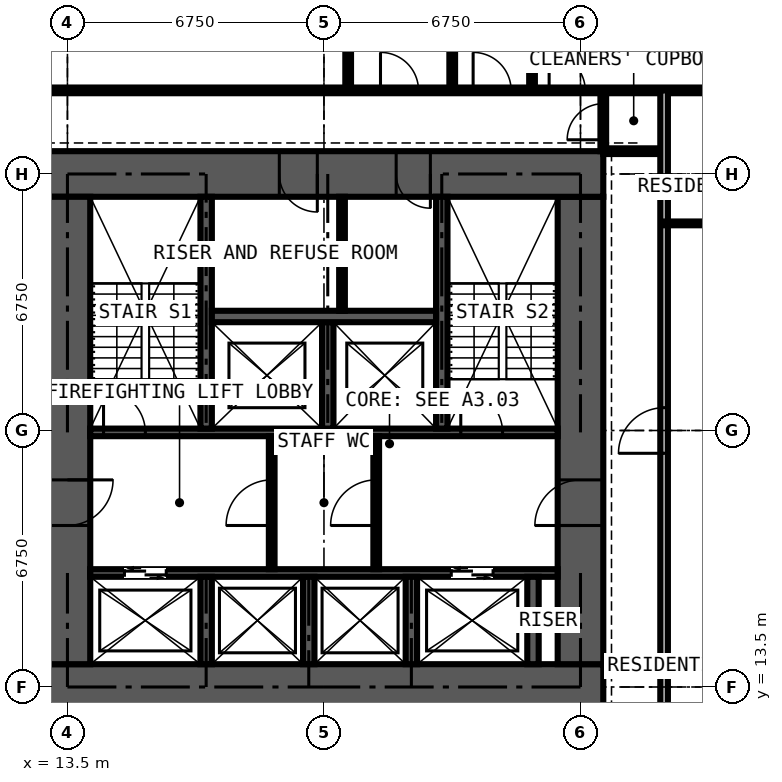
"""IFC4 building model, lengths in metres.
Left out: names, types, materials, properties, quantities, classifications, styles, units other than length and angle.
Written with IfcOpenShell. Run it as: python <this file> out.ifc"""

import sys

from ifc_helpers import new_model, si_unit, direction, frame, frame_2d, origin, place, context, subcontext, project, spatial, rectangle, extrude, element, fill, save


model = new_model("IFC4")
c1 = context("Model", 3, precision=1e-05, world=origin(), true_north=direction((0.0, 1.0)))
c2 = subcontext(c1, "Body", "Model", "MODEL_VIEW")
j1 = project(units=[si_unit("LENGTHUNIT", "METRE"), si_unit("PLANEANGLEUNIT", "RADIAN")], contexts=[c1])
p1 = place(None, origin())
s1 = spatial("IfcSite", under=j1, at=p1, CompositionType="ELEMENT")
p2 = place(p1, origin())
s2 = spatial("IfcBuilding", under=s1, at=p2, CompositionType="ELEMENT")
p3 = place(p2, frame((0.0, 0.0, 61.2)))
s3 = spatial("IfcBuildingStorey", under=s2, at=p3, CompositionType="ELEMENT", Elevation=61.2)
p4 = place(p3, frame((12.9, 13.5, 0.0), z_axis=(0.0, 0.0, 1.0), x_axis=(1.0, 0.0, 0.0)))
e1 = element("IfcWall", 1, at=p4, inside=s3, PredefinedType="SHEAR", context=c2, shape_type="SweptSolid", body=[
    extrude(rectangle(XDim=14.7, YDim=1.2, at=frame_2d((7.35, 0.0))), origin(), (0.0, 0.0, 1.0), 3.6),
])
p5 = place(p3, frame((27.0, 14.1, 0.0), z_axis=(0.0, 0.0, 1.0), x_axis=(0.0, 1.0, 0.0)))
e2 = element("IfcWall", 2, at=p5, inside=s3, PredefinedType="SHEAR", context=c2, shape_type="SweptSolid", body=[
    extrude(rectangle(XDim=12.3, YDim=1.2, at=frame_2d((6.15, 0.0))), origin(), (0.0, 0.0, 1.0), 3.6),
])
p6 = place(p5, frame((3.65, 0.0, 0.0)))
e3 = element("IfcOpeningElement", 3, at=p6, cuts=e2, PredefinedType="OPENING", context=c2, shape_type="SweptSolid", body=[
    extrude(rectangle(XDim=1.2, YDim=2.2, at=frame_2d((0.6, 1.1))), frame((0.0, 0.61, 0.0), z_axis=(0.0, -1.0, 0.0), x_axis=(1.0, 0.0, 0.0)), (0.0, 0.0, 1.0), 1.22),
])
p7 = place(p3, frame((27.6, 27.0, 0.0), z_axis=(0.0, 0.0, 1.0), x_axis=(-1.0, 0.0, 0.0)))
e4 = element("IfcWall", 4, at=p7, inside=s3, PredefinedType="SHEAR", context=c2, shape_type="SweptSolid", body=[
    extrude(rectangle(XDim=14.7, YDim=1.2, at=frame_2d((7.35, 0.0))), origin(), (0.0, 0.0, 1.0), 3.6),
])
p8 = place(p7, frame((4.55, 0.0, 0.0)))
e5 = element("IfcOpeningElement", 5, at=p8, cuts=e4, PredefinedType="OPENING", context=c2, shape_type="SweptSolid", body=[
    extrude(rectangle(XDim=0.9, YDim=2.2, at=frame_2d((0.45, 1.1))), frame((0.0, 0.61, 0.0), z_axis=(0.0, -1.0, 0.0), x_axis=(1.0, 0.0, 0.0)), (0.0, 0.0, 1.0), 1.22),
])
p9 = place(p7, frame((7.525, 0.0, 0.0)))
e6 = element("IfcOpeningElement", 6, at=p9, cuts=e4, PredefinedType="OPENING", context=c2, shape_type="SweptSolid", body=[
    extrude(rectangle(XDim=1.0, YDim=2.2, at=frame_2d((0.5, 1.1))), frame((0.0, 0.61, 0.0), z_axis=(0.0, -1.0, 0.0), x_axis=(1.0, 0.0, 0.0)), (0.0, 0.0, 1.0), 1.22),
])
p10 = place(p3, frame((13.5, 26.4, 0.0), z_axis=(0.0, 0.0, 1.0), x_axis=(0.0, -1.0, 0.0)))
e7 = element("IfcWall", 7, at=p10, inside=s3, PredefinedType="SHEAR", context=c2, shape_type="SweptSolid", body=[
    extrude(rectangle(XDim=12.3, YDim=1.2, at=frame_2d((6.15, 0.0))), origin(), (0.0, 0.0, 1.0), 3.6),
])
p11 = place(p10, frame((7.45, 0.0, 0.0)))
e8 = element("IfcOpeningElement", 8, at=p11, cuts=e7, PredefinedType="OPENING", context=c2, shape_type="SweptSolid", body=[
    extrude(rectangle(XDim=1.2, YDim=2.2, at=frame_2d((0.6, 1.1))), frame((0.0, 0.61, 0.0), z_axis=(0.0, -1.0, 0.0), x_axis=(1.0, 0.0, 0.0)), (0.0, 0.0, 1.0), 1.22),
])
p12 = place(p3, frame((14.1, 16.5, 0.0), z_axis=(0.0, 0.0, 1.0), x_axis=(1.0, 0.0, 0.0)))
e9 = element("IfcWall", 9, at=p12, inside=s3, PredefinedType="SHEAR", context=c2, shape_type="SweptSolid", body=[
    extrude(rectangle(XDim=12.3, YDim=0.2, at=frame_2d((6.15, 0.0))), origin(), (0.0, 0.0, 1.0), 3.6),
])
p13 = place(p12, frame((0.9, 0.0, 0.0)))
e10 = element("IfcOpeningElement", 10, at=p13, cuts=e9, PredefinedType="OPENING", context=c2, shape_type="SweptSolid", body=[
    extrude(rectangle(XDim=1.1, YDim=2.2, at=frame_2d((0.55, 1.1))), frame((0.0, 0.11, 0.0), z_axis=(0.0, -1.0, 0.0), x_axis=(1.0, 0.0, 0.0)), (0.0, 0.0, 1.0), 0.22),
])
p14 = place(p12, frame((9.5, 0.0, 0.0)))
e11 = element("IfcOpeningElement", 11, at=p14, cuts=e9, PredefinedType="OPENING", context=c2, shape_type="SweptSolid", body=[
    extrude(rectangle(XDim=1.1, YDim=2.2, at=frame_2d((0.55, 1.1))), frame((0.0, 0.11, 0.0), z_axis=(0.0, -1.0, 0.0), x_axis=(1.0, 0.0, 0.0)), (0.0, 0.0, 1.0), 0.22),
])
p15 = place(p3, frame((14.1, 20.2, 0.0), z_axis=(0.0, 0.0, 1.0), x_axis=(1.0, 0.0, 0.0)))
e12 = element("IfcWall", 12, at=p15, inside=s3, PredefinedType="SHEAR", context=c2, shape_type="SweptSolid", body=[
    extrude(rectangle(XDim=12.3, YDim=0.2, at=frame_2d((6.15, 0.0))), origin(), (0.0, 0.0, 1.0), 3.6),
])
p16 = place(p15, frame((0.35, 0.0, 0.0)))
e13 = element("IfcOpeningElement", 13, at=p16, cuts=e12, PredefinedType="OPENING", context=c2, shape_type="SweptSolid", body=[
    extrude(rectangle(XDim=1.1, YDim=2.2, at=frame_2d((0.55, 1.1))), frame((0.0, 0.11, 0.0), z_axis=(0.0, -1.0, 0.0), x_axis=(1.0, 0.0, 0.0)), (0.0, 0.0, 1.0), 0.22),
])
p17 = place(p15, frame((9.75, 0.0, 0.0)))
e14 = element("IfcOpeningElement", 14, at=p17, cuts=e12, PredefinedType="OPENING", context=c2, shape_type="SweptSolid", body=[
    extrude(rectangle(XDim=1.1, YDim=2.2, at=frame_2d((0.55, 1.1))), frame((0.0, 0.11, 0.0), z_axis=(0.0, -1.0, 0.0), x_axis=(1.0, 0.0, 0.0)), (0.0, 0.0, 1.0), 0.22),
])
for number, where, z_axis, x_axis in (
    (15, (17.15, 20.3, 0.0), (0.0, 0.0, 1.0), (0.0, 1.0, 0.0)),
    (16, (23.35, 20.3, 0.0), (0.0, 0.0, 1.0), (0.0, 1.0, 0.0)),
):
    element("IfcWall", number, at=place(p3, frame(where, z_axis=z_axis, x_axis=x_axis)), inside=s3, PredefinedType="SHEAR", context=c2, shape_type="SweptSolid", body=[
        extrude(rectangle(XDim=6.1, YDim=0.3, at=frame_2d((3.05, 0.0))), origin(), (0.0, 0.0, 1.0), 3.6),
    ])
p18 = place(p3, frame((20.35, 20.3, 0.0), z_axis=(0.0, 0.0, 1.0), x_axis=(0.0, 1.0, 0.0)))
e17 = element("IfcWall", 17, at=p18, inside=s3, PredefinedType="SHEAR", context=c2, shape_type="SweptSolid", body=[
    extrude(rectangle(XDim=2.8, YDim=0.3, at=frame_2d((1.4, 0.0))), origin(), (0.0, 0.0, 1.0), 3.6),
])
p19 = place(p3, frame((17.3, 23.25, 0.0), z_axis=(0.0, 0.0, 1.0), x_axis=(1.0, 0.0, 0.0)))
e18 = element("IfcWall", 18, at=p19, inside=s3, PredefinedType="SHEAR", context=c2, shape_type="SweptSolid", body=[
    extrude(rectangle(XDim=5.9, YDim=0.3, at=frame_2d((2.95, 0.0))), origin(), (0.0, 0.0, 1.0), 3.6),
])
for number, where, z_axis, x_axis in (
    (19, (17.15, 14.1, 0.0), (0.0, 0.0, 1.0), (0.0, 1.0, 0.0)),
    (20, (19.85, 14.1, 0.0), (0.0, 0.0, 1.0), (0.0, 1.0, 0.0)),
    (21, (22.55, 14.1, 0.0), (0.0, 0.0, 1.0), (0.0, 1.0, 0.0)),
    (22, (25.75, 14.1, 0.0), (0.0, 0.0, 1.0), (0.0, 1.0, 0.0)),
):
    element("IfcWall", number, at=place(p3, frame(where, z_axis=z_axis, x_axis=x_axis)), inside=s3, PredefinedType="SHEAR", context=c2, shape_type="SweptSolid", body=[
        extrude(rectangle(XDim=2.3, YDim=0.3, at=frame_2d((1.15, 0.0))), origin(), (0.0, 0.0, 1.0), 3.6),
    ])
p20 = place(p3, frame((18.875, 16.6, 0.0), z_axis=(0.0, 0.0, 1.0), x_axis=(0.0, 1.0, 0.0)))
e23 = element("IfcWall", 23, at=p20, inside=s3, PredefinedType="PARTITIONING", context=c2, shape_type="SweptSolid", body=[
    extrude(rectangle(XDim=3.5, YDim=0.15, at=frame_2d((1.75, 0.0))), origin(), (0.0, 0.0, 1.0), 3.375),
])
p21 = place(p20, frame((1.15, 0.0, 0.0)))
e24 = element("IfcOpeningElement", 24, at=p21, cuts=e23, PredefinedType="OPENING", context=c2, shape_type="SweptSolid", body=[
    extrude(rectangle(XDim=1.2, YDim=2.2, at=frame_2d((0.6, 1.1))), frame((0.0, 0.085, 0.0), z_axis=(0.0, -1.0, 0.0), x_axis=(1.0, 0.0, 0.0)), (0.0, 0.0, 1.0), 0.17),
])
p22 = place(p3, frame((21.625, 16.6, 0.0), z_axis=(0.0, 0.0, 1.0), x_axis=(0.0, 1.0, 0.0)))
e25 = element("IfcWall", 25, at=p22, inside=s3, PredefinedType="PARTITIONING", context=c2, shape_type="SweptSolid", body=[
    extrude(rectangle(XDim=3.5, YDim=0.15, at=frame_2d((1.75, 0.0))), origin(), (0.0, 0.0, 1.0), 3.375),
])
p23 = place(p22, frame((1.15, 0.0, 0.0)))
e26 = element("IfcOpeningElement", 26, at=p23, cuts=e25, PredefinedType="OPENING", context=c2, shape_type="SweptSolid", body=[
    extrude(rectangle(XDim=1.2, YDim=2.2, at=frame_2d((0.6, 1.1))), frame((0.0, 0.085, 0.0), z_axis=(0.0, -1.0, 0.0), x_axis=(1.0, 0.0, 0.0)), (0.0, 0.0, 1.0), 0.17),
])
p24 = place(p3, frame((20.725, 23.4, 0.0), z_axis=(0.0, 0.0, 1.0), x_axis=(0.0, 1.0, 0.0)))
e27 = element("IfcWall", 27, at=p24, inside=s3, PredefinedType="PARTITIONING", context=c2, shape_type="SweptSolid", body=[
    extrude(rectangle(XDim=3.0, YDim=0.15, at=frame_2d((1.5, 0.0))), origin(), (0.0, 0.0, 1.0), 3.375),
])
p25 = place(p3, frame((11.3, 29.2, 0.0), z_axis=(0.0, 0.0, 1.0), x_axis=(1.0, 0.0, 0.0)))
e28 = element("IfcWall", 28, at=p25, inside=s3, PredefinedType="PARTITIONING", context=c2, shape_type="SweptSolid", body=[
    extrude(rectangle(XDim=19.075, YDim=0.15, at=frame_2d((9.538, 0.0))), origin(), (0.0, 0.0, 1.0), 3.375),
])
p26 = place(p25, frame((12.875, 0.0, 0.0)))
e29 = element("IfcOpeningElement", 29, at=p26, cuts=e28, PredefinedType="OPENING", context=c2, shape_type="SweptSolid", body=[
    extrude(rectangle(XDim=1.0, YDim=2.2, at=frame_2d((0.5, 1.1))), frame((0.0, 0.085, 0.0), z_axis=(0.0, -1.0, 0.0), x_axis=(1.0, 0.0, 0.0)), (0.0, 0.0, 1.0), 0.17),
])
p27 = place(p25, frame((10.438, 0.0, 0.0)))
e30 = element("IfcOpeningElement", 30, at=p27, cuts=e28, PredefinedType="OPENING", context=c2, shape_type="SweptSolid", body=[
    extrude(rectangle(XDim=1.0, YDim=2.2, at=frame_2d((0.5, 1.1))), frame((0.0, 0.085, 0.0), z_axis=(0.0, -1.0, 0.0), x_axis=(1.0, 0.0, 0.0)), (0.0, 0.0, 1.0), 0.17),
])
p28 = place(p25, frame((14.875, 0.0, 0.0)))
e31 = element("IfcOpeningElement", 31, at=p28, cuts=e28, PredefinedType="OPENING", context=c2, shape_type="SweptSolid", body=[
    extrude(rectangle(XDim=0.95, YDim=2.2, at=frame_2d((0.475, 1.1))), frame((0.0, 0.085, 0.0), z_axis=(0.0, -1.0, 0.0), x_axis=(1.0, 0.0, 0.0)), (0.0, 0.0, 1.0), 0.17),
])
p29 = place(p3, frame((20.887, 29.2, 0.0), z_axis=(0.0, 0.0, 1.0), x_axis=(0.0, 1.0, 0.0)))
e32 = element("IfcWall", 32, at=p29, inside=s3, PredefinedType="PARTITIONING", context=c2, shape_type="SweptSolid", body=[
    extrude(rectangle(XDim=5.65, YDim=0.15, at=frame_2d((2.825, 0.0))), origin(), (0.0, 0.0, 1.0), 3.375),
])
p30 = place(p3, frame((23.625, 29.2, 0.0), z_axis=(0.0, 0.0, 1.0), x_axis=(0.0, 1.0, 0.0)))
e33 = element("IfcWall", 33, at=p30, inside=s3, PredefinedType="PARTITIONING", context=c2, shape_type="SweptSolid", body=[
    extrude(rectangle(XDim=12.034, YDim=0.15, at=frame_2d((6.017, 0.0))), origin(), (0.0, 0.0, 1.0), 3.375),
])
p31 = place(p3, frame((25.725, 29.2, 0.0), z_axis=(0.0, 0.0, 1.0), x_axis=(0.0, 1.0, 0.0)))
e34 = element("IfcWall", 34, at=p31, inside=s3, PredefinedType="PARTITIONING", context=c2, shape_type="SweptSolid", body=[
    extrude(rectangle(XDim=5.65, YDim=0.15, at=frame_2d((2.825, 0.0))), origin(), (0.0, 0.0, 1.0), 3.375),
])
p32 = place(p3, frame((27.6, 27.6, 0.0), z_axis=(0.0, 0.0, 1.0), x_axis=(0.0, 1.0, 0.0)))
e35 = element("IfcWall", 35, at=p32, inside=s3, PredefinedType="PARTITIONING", context=c2, shape_type="SweptSolid", body=[
    extrude(rectangle(XDim=1.6, YDim=0.15, at=frame_2d((0.8, 0.0))), origin(), (0.0, 0.0, 1.0), 3.375),
])
p33 = place(p32, frame((0.3, 0.0, 0.0)))
e36 = element("IfcOpeningElement", 36, at=p33, cuts=e35, PredefinedType="OPENING", context=c2, shape_type="SweptSolid", body=[
    extrude(rectangle(XDim=0.95, YDim=2.2, at=frame_2d((0.475, 1.1))), frame((0.0, 0.085, 0.0), z_axis=(0.0, -1.0, 0.0), x_axis=(1.0, 0.0, 0.0)), (0.0, 0.0, 1.0), 0.17),
])
p34 = place(p3, frame((27.6, 27.6, 0.0), z_axis=(0.0, 0.0, 1.0), x_axis=(1.0, 0.0, 0.0)))
e37 = element("IfcWall", 37, at=p34, inside=s3, PredefinedType="PARTITIONING", context=c2, shape_type="SweptSolid", body=[
    extrude(rectangle(XDim=1.6, YDim=0.15, at=frame_2d((0.8, 0.0))), origin(), (0.0, 0.0, 1.0), 2.877),
])
p35 = place(p3, frame((29.2, 11.3, 0.0), z_axis=(0.0, 0.0, 1.0), x_axis=(0.0, 1.0, 0.0)))
e38 = element("IfcWall", 38, at=p35, inside=s3, PredefinedType="PARTITIONING", context=c2, shape_type="SweptSolid", body=[
    extrude(rectangle(XDim=17.9, YDim=0.2, at=frame_2d((8.95, 0.0))), origin(), (0.0, 0.0, 1.0), 3.375),
])
p36 = place(p35, frame((8.35, 0.0, 0.0)))
e39 = element("IfcOpeningElement", 39, at=p36, cuts=e38, PredefinedType="OPENING", context=c2, shape_type="SweptSolid", body=[
    extrude(rectangle(XDim=1.2, YDim=2.2, at=frame_2d((0.6, 1.1))), frame((0.0, 0.11, 0.0), z_axis=(0.0, -1.0, 0.0), x_axis=(1.0, 0.0, 0.0)), (0.0, 0.0, 1.0), 0.22),
])
p37 = place(p3, frame((29.2, 25.7, 0.0), z_axis=(0.0, 0.0, 1.0), x_axis=(1.0, 0.0, 0.0)))
e40 = element("IfcWall", 40, at=p37, inside=s3, PredefinedType="SHEAR", context=c2, shape_type="SweptSolid", body=[
    extrude(rectangle(XDim=3.45, YDim=0.1, at=frame_2d((1.725, 0.0))), origin(), (0.0, 0.0, 1.0), 3.375),
])
p38 = place(p13, origin())
e41 = element("IfcDoor", 41, at=p38, inside=s3, OperationType="DOUBLE_DOOR_SLIDING", PredefinedType="DOOR", context=c2, shape_type="SweptSolid", body=[
    extrude(rectangle(XDim=1.1, YDim=2.2, at=frame_2d((0.55, 1.1))), frame((0.0, 0.025, 0.0), z_axis=(0.0, -1.0, 0.0), x_axis=(1.0, 0.0, 0.0)), (0.0, 0.0, 1.0), 0.05),
])
fill(e10, e41)
p39 = place(p14, origin())
e42 = element("IfcDoor", 42, at=p39, inside=s3, OperationType="DOUBLE_DOOR_SLIDING", PredefinedType="DOOR", context=c2, shape_type="SweptSolid", body=[
    extrude(rectangle(XDim=1.1, YDim=2.2, at=frame_2d((0.55, 1.1))), frame((0.0, 0.025, 0.0), z_axis=(0.0, -1.0, 0.0), x_axis=(1.0, 0.0, 0.0)), (0.0, 0.0, 1.0), 0.05),
])
fill(e11, e42)
p40 = place(p11, origin())
e43 = element("IfcDoor", 43, at=p40, inside=s3, OperationType="DOUBLE_DOOR_SINGLE_SWING", PredefinedType="DOOR", context=c2, shape_type="SweptSolid", body=[
    extrude(rectangle(XDim=1.2, YDim=2.2, at=frame_2d((0.6, 1.1))), frame((0.0, 0.025, 0.0), z_axis=(0.0, -1.0, 0.0), x_axis=(1.0, 0.0, 0.0)), (0.0, 0.0, 1.0), 0.05),
])
fill(e8, e43)
p41 = place(p6, origin())
e44 = element("IfcDoor", 44, at=p41, inside=s3, OperationType="DOUBLE_DOOR_SINGLE_SWING", PredefinedType="DOOR", context=c2, shape_type="SweptSolid", body=[
    extrude(rectangle(XDim=1.2, YDim=2.2, at=frame_2d((0.6, 1.1))), frame((0.0, 0.025, 0.0), z_axis=(0.0, -1.0, 0.0), x_axis=(1.0, 0.0, 0.0)), (0.0, 0.0, 1.0), 0.05),
])
fill(e3, e44)
p42 = place(p21, origin())
e45 = element("IfcDoor", 45, at=p42, inside=s3, OperationType="DOUBLE_DOOR_SINGLE_SWING", PredefinedType="DOOR", context=c2, shape_type="SweptSolid", body=[
    extrude(rectangle(XDim=1.2, YDim=2.2, at=frame_2d((0.6, 1.1))), frame((0.0, 0.025, 0.0), z_axis=(0.0, -1.0, 0.0), x_axis=(1.0, 0.0, 0.0)), (0.0, 0.0, 1.0), 0.05),
])
fill(e24, e45)
p43 = place(p23, origin())
e46 = element("IfcDoor", 46, at=p43, inside=s3, OperationType="DOUBLE_DOOR_SINGLE_SWING", PredefinedType="DOOR", context=c2, shape_type="SweptSolid", body=[
    extrude(rectangle(XDim=1.2, YDim=2.2, at=frame_2d((0.6, 1.1))), frame((0.0, 0.025, 0.0), z_axis=(0.0, -1.0, 0.0), x_axis=(1.0, 0.0, 0.0)), (0.0, 0.0, 1.0), 0.05),
])
fill(e26, e46)
p44 = place(p8, origin())
e47 = element("IfcDoor", 47, at=p44, inside=s3, OperationType="SINGLE_SWING_LEFT", PredefinedType="DOOR", context=c2, shape_type="SweptSolid", body=[
    extrude(rectangle(XDim=0.9, YDim=2.2, at=frame_2d((0.45, 1.1))), frame((0.0, 0.4, 0.0), z_axis=(0.0, -1.0, 0.0), x_axis=(1.0, 0.0, 0.0)), (0.0, 0.0, 1.0), 0.8),
])
fill(e5, e47)
p45 = place(p9, origin())
e48 = element("IfcDoor", 48, at=p45, inside=s3, OperationType="SINGLE_SWING_LEFT", PredefinedType="DOOR", context=c2, shape_type="SweptSolid", body=[
    extrude(rectangle(XDim=1.0, YDim=2.2, at=frame_2d((0.5, 1.1))), frame((0.0, 0.025, 0.0), z_axis=(0.0, -1.0, 0.0), x_axis=(1.0, 0.0, 0.0)), (0.0, 0.0, 1.0), 0.05),
])
fill(e6, e48)
p46 = place(p16, origin())
e49 = element("IfcDoor", 49, at=p46, inside=s3, OperationType="SINGLE_SWING_LEFT", PredefinedType="DOOR", context=c2, shape_type="SweptSolid", body=[
    extrude(rectangle(XDim=1.1, YDim=2.2, at=frame_2d((0.55, 1.1))), frame((0.0, 0.025, 0.0), z_axis=(0.0, -1.0, 0.0), x_axis=(1.0, 0.0, 0.0)), (0.0, 0.0, 1.0), 0.05),
])
fill(e13, e49)
p47 = place(p17, origin())
e50 = element("IfcDoor", 50, at=p47, inside=s3, OperationType="SINGLE_SWING_LEFT", PredefinedType="DOOR", context=c2, shape_type="SweptSolid", body=[
    extrude(rectangle(XDim=1.1, YDim=2.2, at=frame_2d((0.55, 1.1))), frame((0.0, 0.025, 0.0), z_axis=(0.0, -1.0, 0.0), x_axis=(1.0, 0.0, 0.0)), (0.0, 0.0, 1.0), 0.05),
])
fill(e14, e50)
p48 = place(p33, origin())
e51 = element("IfcDoor", 51, at=p48, inside=s3, OperationType="SINGLE_SWING_LEFT", PredefinedType="DOOR", context=c2, shape_type="SweptSolid", body=[
    extrude(rectangle(XDim=0.95, YDim=2.2, at=frame_2d((0.475, 1.1))), frame((0.0, 0.025, 0.0), z_axis=(0.0, -1.0, 0.0), x_axis=(1.0, 0.0, 0.0)), (0.0, 0.0, 1.0), 0.05),
])
fill(e36, e51)
p49 = place(p26, origin())
e52 = element("IfcDoor", 52, at=p49, inside=s3, OperationType="SINGLE_SWING_LEFT", PredefinedType="DOOR", context=c2, shape_type="SweptSolid", body=[
    extrude(rectangle(XDim=1.0, YDim=2.2, at=frame_2d((0.5, 1.1))), frame((0.0, 0.025, 0.0), z_axis=(0.0, -1.0, 0.0), x_axis=(1.0, 0.0, 0.0)), (0.0, 0.0, 1.0), 0.05),
])
fill(e29, e52)
p50 = place(p27, origin())
e53 = element("IfcDoor", 53, at=p50, inside=s3, OperationType="SINGLE_SWING_LEFT", PredefinedType="DOOR", context=c2, shape_type="SweptSolid", body=[
    extrude(rectangle(XDim=1.0, YDim=2.2, at=frame_2d((0.5, 1.1))), frame((0.0, 0.025, 0.0), z_axis=(0.0, -1.0, 0.0), x_axis=(1.0, 0.0, 0.0)), (0.0, 0.0, 1.0), 0.05),
])
fill(e30, e53)
p51 = place(p28, origin())
e54 = element("IfcDoor", 54, at=p51, inside=s3, OperationType="SINGLE_SWING_LEFT", PredefinedType="DOOR", context=c2, shape_type="SweptSolid", body=[
    extrude(rectangle(XDim=0.95, YDim=2.2, at=frame_2d((0.475, 1.1))), frame((0.0, 0.025, 0.0), z_axis=(0.0, -1.0, 0.0), x_axis=(1.0, 0.0, 0.0)), (0.0, 0.0, 1.0), 0.05),
])
fill(e31, e54)
p52 = place(p36, origin())
e55 = element("IfcDoor", 55, at=p52, inside=s3, OperationType="DOUBLE_DOOR_SINGLE_SWING", PredefinedType="DOOR", context=c2, shape_type="SweptSolid", body=[
    extrude(rectangle(XDim=1.2, YDim=2.2, at=frame_2d((0.6, 1.1))), frame((0.0, 0.025, 0.0), z_axis=(0.0, -1.0, 0.0), x_axis=(1.0, 0.0, 0.0)), (0.0, 0.0, 1.0), 0.05),
])
fill(e39, e55)
save(model, sys.argv[1])
